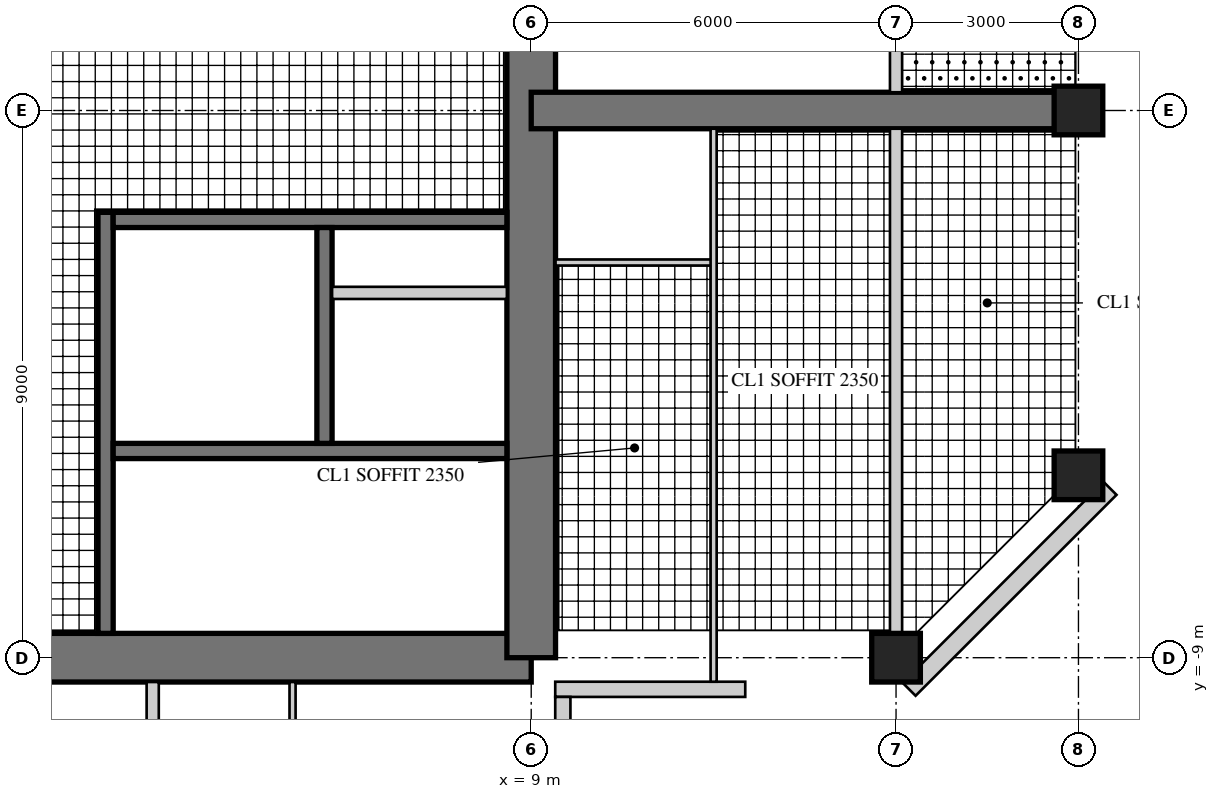
"""IFC4 building model, lengths in metres.
Left out: names, types, materials, properties, quantities, classifications, styles, units other than length and angle.
Written with IfcOpenShell. Run it as: python <this file> out.ifc"""

import sys

from ifc_helpers import new_model, si_unit, direction, frame, frame_2d, origin, origin_2d, place, context, subcontext, project, spatial, rectangle, hollow_rectangle, extrude, element, fill, save


model = new_model("IFC4")
c1 = context("Model", 3, precision=1e-05, world=origin(), true_north=direction((0.0, 1.0)))
c2 = subcontext(c1, "Body", "Model", "MODEL_VIEW")
j1 = project(units=[si_unit("LENGTHUNIT", "METRE"), si_unit("PLANEANGLEUNIT", "RADIAN")], contexts=[c1])
p1 = place(None, origin())
s1 = spatial("IfcSite", under=j1, at=p1, CompositionType="ELEMENT")
p2 = place(p1, origin())
s2 = spatial("IfcBuilding", under=s1, at=p2, CompositionType="ELEMENT")
p3 = place(p2, frame((0.0, 0.0, 235.7)))
s3 = spatial("IfcBuildingStorey", under=s2, at=p3, CompositionType="ELEMENT", Elevation=235.7)
p4 = place(p3, frame((-9.0, -9.0, 0.0), z_axis=(0.0, 0.0, 1.0), x_axis=(1.0, 0.0, 0.0)))
e1 = element("IfcWall", 1, at=p4, inside=s3, PredefinedType="SHEAR", context=c2, shape_type="SweptSolid", body=[
    extrude(rectangle(XDim=18.0, YDim=0.8, at=frame_2d((9.0, 0.0))), origin(), (0.0, 0.0, 1.0), 3.4),
])
p5 = place(p4, frame((9.8, 0.0, 0.0)))
e2 = element("IfcOpeningElement", 2, at=p5, cuts=e1, PredefinedType="OPENING", context=c2, shape_type="SweptSolid", body=[
    extrude(rectangle(XDim=1.0, YDim=2.4, at=frame_2d((0.5, 1.2))), frame((0.0, 0.41, 0.0), z_axis=(0.0, -1.0, 0.0), x_axis=(1.0, 0.0, 0.0)), (0.0, 0.0, 1.0), 0.82),
])
p6 = place(p3, frame((9.0, -9.0, 0.0), z_axis=(0.0, 0.0, 1.0), x_axis=(0.0, 1.0, 0.0)))
e3 = element("IfcWall", 3, at=p6, inside=s3, PredefinedType="SHEAR", context=c2, shape_type="SweptSolid", body=[
    extrude(rectangle(XDim=18.0, YDim=0.8, at=frame_2d((9.0, 0.0))), origin(), (0.0, 0.0, 1.0), 3.4),
])
p7 = place(p6, frame((9.8, 0.0, 0.0)))
e4 = element("IfcOpeningElement", 4, at=p7, cuts=e3, PredefinedType="OPENING", context=c2, shape_type="SweptSolid", body=[
    extrude(rectangle(XDim=1.0, YDim=2.4, at=frame_2d((0.5, 1.2))), frame((0.0, 0.41, 0.0), z_axis=(0.0, -1.0, 0.0), x_axis=(1.0, 0.0, 0.0)), (0.0, 0.0, 1.0), 0.82),
])
p8 = place(p3, frame((2.0, -1.675, 0.0), z_axis=(0.0, 0.0, 1.0), x_axis=(0.0, -1.0, 0.0)))
e5 = element("IfcWall", 5, at=p8, inside=s3, PredefinedType="SHEAR", context=c2, shape_type="SweptSolid", body=[
    extrude(rectangle(XDim=6.925, YDim=0.25, at=frame_2d((3.462, 0.0))), origin(), (0.0, 0.0, 1.0), 3.4),
])
p9 = place(p8, frame((0.725, 0.0, 0.0)))
e6 = element("IfcOpeningElement", 6, at=p9, cuts=e5, PredefinedType="OPENING", context=c2, shape_type="SweptSolid", body=[
    extrude(rectangle(XDim=1.0, YDim=2.1, at=frame_2d((0.5, 1.05))), frame((0.0, 0.135, 0.0), z_axis=(0.0, -1.0, 0.0), x_axis=(1.0, 0.0, 0.0)), (0.0, 0.0, 1.0), 0.27),
])
p10 = place(p3, frame((2.125, -1.8, 0.0), z_axis=(0.0, 0.0, 1.0), x_axis=(1.0, 0.0, 0.0)))
e7 = element("IfcWall", 7, at=p10, inside=s3, PredefinedType="SHEAR", context=c2, shape_type="SweptSolid", body=[
    extrude(rectangle(XDim=6.475, YDim=0.25, at=frame_2d((3.238, 0.0))), origin(), (0.0, 0.0, 1.0), 3.4),
])
p11 = place(p3, frame((2.125, -5.6, 0.0), z_axis=(0.0, 0.0, 1.0), x_axis=(1.0, 0.0, 0.0)))
e8 = element("IfcWall", 8, at=p11, inside=s3, PredefinedType="SHEAR", context=c2, shape_type="SweptSolid", body=[
    extrude(rectangle(XDim=6.475, YDim=0.25, at=frame_2d((3.238, 0.0))), origin(), (0.0, 0.0, 1.0), 3.4),
])
p12 = place(p11, frame((0.175, 0.0, 0.0)))
e9 = element("IfcOpeningElement", 9, at=p12, cuts=e8, PredefinedType="OPENING", context=c2, shape_type="SweptSolid", body=[
    extrude(rectangle(XDim=1.0, YDim=2.1, at=frame_2d((0.5, 1.05))), frame((0.0, 0.135, 0.0), z_axis=(0.0, -1.0, 0.0), x_axis=(1.0, 0.0, 0.0)), (0.0, 0.0, 1.0), 0.27),
])
p13 = place(p3, frame((5.6, -1.925, 0.0), z_axis=(0.0, 0.0, 1.0), x_axis=(0.0, -1.0, 0.0)))
e10 = element("IfcWall", 10, at=p13, inside=s3, PredefinedType="SHEAR", context=c2, shape_type="SweptSolid", body=[
    extrude(rectangle(XDim=3.55, YDim=0.25, at=frame_2d((1.775, 0.0))), origin(), (0.0, 0.0, 1.0), 3.4),
])
p14 = place(p13, frame((1.525, 0.0, 0.0)))
e11 = element("IfcOpeningElement", 11, at=p14, cuts=e10, PredefinedType="OPENING", context=c2, shape_type="SweptSolid", body=[
    extrude(rectangle(XDim=1.1, YDim=2.2, at=frame_2d((0.55, 1.1))), frame((0.0, 0.135, 0.0), z_axis=(0.0, -1.0, 0.0), x_axis=(1.0, 0.0, 0.0)), (0.0, 0.0, 1.0), 0.27),
])
p15 = place(p13, frame((0.075, 0.0, 0.0)))
e12 = element("IfcOpeningElement", 12, at=p15, cuts=e10, PredefinedType="OPENING", context=c2, shape_type="SweptSolid", body=[
    extrude(rectangle(XDim=0.8, YDim=2.1, at=frame_2d((0.4, 1.05))), frame((0.0, 0.135, 0.0), z_axis=(0.0, -1.0, 0.0), x_axis=(1.0, 0.0, 0.0)), (0.0, 0.0, 1.0), 0.27),
])
p16 = place(p3, frame((5.725, -3.0, 0.0), z_axis=(0.0, 0.0, 1.0), x_axis=(1.0, 0.0, 0.0)))
e13 = element("IfcWall", 13, at=p16, inside=s3, PredefinedType="PARTITIONING", context=c2, shape_type="SweptSolid", body=[
    extrude(rectangle(XDim=2.875, YDim=0.2, at=frame_2d((1.438, 0.0))), origin(), (0.0, 0.0, 1.0), 3.4),
])
p17 = place(p3, frame((9.0, 0.0, 0.0), z_axis=(0.0, 0.0, 1.0), x_axis=(1.0, 0.0, 0.0)))
e14 = element("IfcWall", 14, at=p17, inside=s3, PredefinedType="SHEAR", context=c2, shape_type="SweptSolid", body=[
    extrude(rectangle(XDim=9.0, YDim=0.6, at=frame_2d((4.5, 0.0))), origin(), (0.0, 0.0, 1.0), 3.4),
])
p18 = place(p17, frame((3.8, 0.0, 0.0)))
e15 = element("IfcOpeningElement", 15, at=p18, cuts=e14, PredefinedType="OPENING", context=c2, shape_type="SweptSolid", body=[
    extrude(rectangle(XDim=1.0, YDim=2.15, at=frame_2d((0.5, 1.075))), frame((0.0, 0.31, 0.0), z_axis=(0.0, -1.0, 0.0), x_axis=(1.0, 0.0, 0.0)), (0.0, 0.0, 1.0), 0.62),
])
p19 = place(p17, frame((7.0, 0.0, 0.0)))
e16 = element("IfcOpeningElement", 16, at=p19, cuts=e14, PredefinedType="OPENING", context=c2, shape_type="SweptSolid", body=[
    extrude(rectangle(XDim=1.0, YDim=2.2, at=frame_2d((0.5, 1.1))), frame((0.0, 0.31, 0.0), z_axis=(0.0, -1.0, 0.0), x_axis=(1.0, 0.0, 0.0)), (0.0, 0.0, 1.0), 0.62),
])
for number, where, z_axis, x_axis in (
    (17, (15.0, -9.0, 0.0), (0.0, 0.0, 1.0), (1.0, 0.0, 0.0)),
    (18, (18.0, -6.0, 0.0), (0.0, 0.0, 1.0), (1.0, 0.0, 0.0)),
    (19, (18.0, 0.0, 0.0), (0.0, 0.0, 1.0), (1.0, 0.0, 0.0)),
):
    element("IfcColumn", number, at=place(p3, frame(where, z_axis=z_axis, x_axis=x_axis)), inside=s3, PredefinedType="COLUMN", context=c2, shape_type="SweptSolid", body=[
        extrude(rectangle(XDim=0.8, YDim=0.8, at=origin_2d()), origin(), (0.0, 0.0, 1.0), 3.4),
    ])
p20 = place(p3, frame((9.395, -9.52, 0.0), z_axis=(0.0, 0.0, 1.0), x_axis=(1.0, 0.0, 0.0)))
e20 = element("IfcWall", 20, at=p20, inside=s3, PredefinedType="SOLIDWALL", context=c2, shape_type="SweptSolid", body=[
    extrude(rectangle(XDim=3.125, YDim=0.25, at=frame_2d((1.562, 0.0))), origin(), (0.0, 0.0, 1.0), 3.22),
])
p21 = place(p20, frame((0.6, 0.0, 0.0)))
e21 = element("IfcOpeningElement", 21, at=p21, cuts=e20, PredefinedType="OPENING", context=c2, shape_type="SweptSolid", body=[
    extrude(rectangle(XDim=1.0, YDim=2.2, at=frame_2d((0.5, 1.1))), frame((0.0, 0.135, 0.0), z_axis=(0.0, -1.0, 0.0), x_axis=(1.0, 0.0, 0.0)), (0.0, 0.0, 1.0), 0.27),
])
p22 = place(p3, frame((15.215, -9.52, 0.0), z_axis=(0.0, 0.0, 1.0), x_axis=(0.707106781187, 0.707106781187, 0.0)))
e22 = element("IfcWall", 22, at=p22, inside=s3, PredefinedType="SOLIDWALL", context=c2, shape_type="SweptSolid", body=[
    extrude(rectangle(XDim=4.674, YDim=0.3, at=frame_2d((2.337, 0.0))), origin(), (0.0, 0.0, 1.0), 3.22),
])
p23 = place(p22, frame((1.887, 0.0, 0.3)))
e23 = element("IfcOpeningElement", 23, at=p23, cuts=e22, PredefinedType="OPENING", context=c2, shape_type="SweptSolid", body=[
    extrude(rectangle(XDim=0.9, YDim=2.4, at=frame_2d((0.45, 1.2))), frame((0.0, 0.16, 0.0), z_axis=(0.0, -1.0, 0.0), x_axis=(1.0, 0.0, 0.0)), (0.0, 0.0, 1.0), 0.32),
])
p24 = place(p3, frame((9.52, -12.52, 0.0), z_axis=(0.0, 0.0, 1.0), x_axis=(0.0, 1.0, 0.0)))
e24 = element("IfcWall", 24, at=p24, inside=s3, PredefinedType="SOLIDWALL", context=c2, shape_type="SweptSolid", body=[
    extrude(rectangle(XDim=2.875, YDim=0.25, at=frame_2d((1.438, 0.0))), origin(), (0.0, 0.0, 1.0), 3.22),
])
p25 = place(p24, frame((0.6, 0.0, 0.0)))
e25 = element("IfcOpeningElement", 25, at=p25, cuts=e24, PredefinedType="OPENING", context=c2, shape_type="SweptSolid", body=[
    extrude(rectangle(XDim=1.0, YDim=2.2, at=frame_2d((0.5, 1.1))), frame((0.0, 0.135, 0.0), z_axis=(0.0, -1.0, 0.0), x_axis=(1.0, 0.0, 0.0)), (0.0, 0.0, 1.0), 0.27),
])
p26 = place(p3, frame((9.4, -2.5, 0.0), z_axis=(0.0, 0.0, 1.0), x_axis=(1.0, 0.0, 0.0)))
e26 = element("IfcWall", 26, at=p26, inside=s3, PredefinedType="PARTITIONING", context=c2, shape_type="SweptSolid", body=[
    extrude(rectangle(XDim=2.65, YDim=0.1, at=frame_2d((1.325, 0.0))), origin(), (0.0, 0.0, 1.0), 3.22),
])
p27 = place(p3, frame((12.0, -9.395, 0.0), z_axis=(0.0, 0.0, 1.0), x_axis=(0.0, 1.0, 0.0)))
e27 = element("IfcWall", 27, at=p27, inside=s3, PredefinedType="PARTITIONING", context=c2, shape_type="SweptSolid", body=[
    extrude(rectangle(XDim=9.095, YDim=0.1, at=frame_2d((4.547, 0.0))), origin(), (0.0, 0.0, 1.0), 3.22),
])
p28 = place(p27, frame((5.545, 0.0, 0.0)))
e28 = element("IfcOpeningElement", 28, at=p28, cuts=e27, PredefinedType="OPENING", context=c2, shape_type="SweptSolid", body=[
    extrude(rectangle(XDim=0.9, YDim=2.1, at=frame_2d((0.45, 1.05))), frame((0.0, 0.06, 0.0), z_axis=(0.0, -1.0, 0.0), x_axis=(1.0, 0.0, 0.0)), (0.0, 0.0, 1.0), 0.12),
])
p29 = place(p27, frame((7.645, 0.0, 0.0)))
e29 = element("IfcOpeningElement", 29, at=p29, cuts=e27, PredefinedType="OPENING", context=c2, shape_type="SweptSolid", body=[
    extrude(rectangle(XDim=0.9, YDim=2.1, at=frame_2d((0.45, 1.05))), frame((0.0, 0.06, 0.0), z_axis=(0.0, -1.0, 0.0), x_axis=(1.0, 0.0, 0.0)), (0.0, 0.0, 1.0), 0.12),
])
p30 = place(p3, frame((15.0, -8.6, 0.0), z_axis=(0.0, 0.0, 1.0), x_axis=(0.0, 1.0, 0.0)))
e30 = element("IfcWall", 30, at=p30, inside=s3, PredefinedType="SOLIDWALL", context=c2, shape_type="SweptSolid", body=[
    extrude(rectangle(XDim=8.3, YDim=0.2, at=frame_2d((4.15, 0.0))), origin(), (0.0, 0.0, 1.0), 2.52),
])
p31 = place(p3, frame((15.0, 0.3, 0.0), z_axis=(0.0, 0.0, 1.0), x_axis=(0.0, 1.0, 0.0)))
e31 = element("IfcWall", 31, at=p31, inside=s3, PredefinedType="SOLIDWALL", context=c2, shape_type="SweptSolid", body=[
    extrude(rectangle(XDim=8.3, YDim=0.2, at=frame_2d((4.15, 0.0))), origin(), (0.0, 0.0, 1.0), 2.52),
])
p32 = place(p31, frame((0.45, 0.0, 0.0)))
e32 = element("IfcOpeningElement", 32, at=p32, cuts=e31, PredefinedType="OPENING", context=c2, shape_type="SweptSolid", body=[
    extrude(rectangle(XDim=1.0, YDim=2.2, at=frame_2d((0.5, 1.1))), frame((0.0, 0.11, 0.0), z_axis=(0.0, -1.0, 0.0), x_axis=(1.0, 0.0, 0.0)), (0.0, 0.0, 1.0), 0.22),
])
p33 = place(p3, frame((5.075, -9.4, 0.0), z_axis=(0.0, 0.0, 1.0), x_axis=(0.0, -1.0, 0.0)))
e33 = element("IfcWall", 33, at=p33, inside=s3, PredefinedType="PARTITIONING", context=c2, shape_type="SweptSolid", body=[
    extrude(rectangle(XDim=3.25, YDim=0.1, at=frame_2d((1.625, 0.0))), origin(), (0.0, 0.0, 1.0), 3.22),
])
p34 = place(p3, frame((2.775, -9.4, 0.0), z_axis=(0.0, 0.0, 1.0), x_axis=(0.0, -1.0, 0.0)))
e34 = element("IfcWall", 34, at=p34, inside=s3, PredefinedType="SOLIDWALL", context=c2, shape_type="SweptSolid", body=[
    extrude(rectangle(XDim=5.6, YDim=0.2, at=frame_2d((2.8, 0.0))), origin(), (0.0, 0.0, 1.0), 3.22),
])
p35 = place(p34, frame((3.75, 0.0, 0.0)))
e35 = element("IfcOpeningElement", 35, at=p35, cuts=e34, PredefinedType="OPENING", context=c2, shape_type="SweptSolid", body=[
    extrude(rectangle(XDim=1.0, YDim=2.15, at=frame_2d((0.5, 1.075))), frame((0.0, 0.11, 0.0), z_axis=(0.0, -1.0, 0.0), x_axis=(1.0, 0.0, 0.0)), (0.0, 0.0, 1.0), 0.22),
])
p36 = place(p21, origin())
e36 = element("IfcDoor", 36, at=p36, inside=s3, OperationType="SINGLE_SWING_RIGHT", PredefinedType="DOOR", context=c2, shape_type="SweptSolid", body=[
    extrude(hollow_rectangle(XDim=1.0, YDim=2.2, WallThickness=0.06, at=frame_2d((0.5, 1.1))), frame((0.0, 0.025, 0.0), z_axis=(0.0, -1.0, 0.0), x_axis=(1.0, 0.0, 0.0)), (0.0, 0.0, 1.0), 0.05),
    extrude(rectangle(XDim=0.879, YDim=2.079, at=frame_2d((0.5, 1.1))), frame((0.0, 0.025, 0.0), z_axis=(0.0, -1.0, 0.0), x_axis=(1.0, 0.0, 0.0)), (0.0, 0.0, 1.0), 0.05),
])
fill(e21, e36)
p37 = place(p23, origin())
e37 = element("IfcWindow", 37, at=p37, inside=s3, PartitioningType="SINGLE_PANEL", PredefinedType="WINDOW", context=c2, shape_type="SweptSolid", body=[
    extrude(hollow_rectangle(XDim=0.9, YDim=2.4, WallThickness=0.06, at=frame_2d((0.45, 1.2))), frame((0.0, 0.03, 0.0), z_axis=(0.0, -1.0, 0.0), x_axis=(1.0, 0.0, 0.0)), (0.0, 0.0, 1.0), 0.06),
    extrude(rectangle(XDim=0.779, YDim=2.279, at=frame_2d((0.45, 1.2))), frame((0.0, 0.03, 0.0), z_axis=(0.0, -1.0, 0.0), x_axis=(1.0, 0.0, 0.0)), (0.0, 0.0, 1.0), 0.06),
])
fill(e23, e37)
p38 = place(p28, origin())
e38 = element("IfcDoor", 38, at=p38, inside=s3, OperationType="SINGLE_SWING_RIGHT", PredefinedType="DOOR", context=c2, shape_type="SweptSolid", body=[
    extrude(rectangle(XDim=0.9, YDim=2.1, at=frame_2d((0.45, 1.05))), frame((0.0, 0.025, 0.0), z_axis=(0.0, -1.0, 0.0), x_axis=(1.0, 0.0, 0.0)), (0.0, 0.0, 1.0), 0.05),
])
fill(e28, e38)
p39 = place(p29, origin())
e39 = element("IfcDoor", 39, at=p39, inside=s3, OperationType="SINGLE_SWING_RIGHT", PredefinedType="DOOR", context=c2, shape_type="SweptSolid", body=[
    extrude(rectangle(XDim=0.9, YDim=2.1, at=frame_2d((0.45, 1.05))), frame((0.0, 0.025, 0.0), z_axis=(0.0, -1.0, 0.0), x_axis=(1.0, 0.0, 0.0)), (0.0, 0.0, 1.0), 0.05),
])
fill(e29, e39)
p40 = place(p32, frame((1.0, 0.0, 0.0), z_axis=(0.0, 0.0, 1.0), x_axis=(-1.0, 0.0, 0.0)))
e40 = element("IfcDoor", 40, at=p40, inside=s3, OperationType="SINGLE_SWING_LEFT", PredefinedType="DOOR", context=c2, shape_type="SweptSolid", body=[
    extrude(rectangle(XDim=1.0, YDim=2.2, at=frame_2d((0.5, 1.1))), frame((0.0, 0.025, 0.0), z_axis=(0.0, -1.0, 0.0), x_axis=(1.0, 0.0, 0.0)), (0.0, 0.0, 1.0), 0.05),
])
fill(e32, e40)
p41 = place(p18, frame((1.0, 0.0, 0.0), z_axis=(0.0, 0.0, 1.0), x_axis=(-1.0, 0.0, 0.0)))
e41 = element("IfcDoor", 41, at=p41, inside=s3, OperationType="SINGLE_SWING_RIGHT", PredefinedType="DOOR", context=c2, shape_type="SweptSolid", body=[
    extrude(rectangle(XDim=1.0, YDim=2.15, at=frame_2d((0.5, 1.075))), frame((0.0, 0.025, 0.0), z_axis=(0.0, -1.0, 0.0), x_axis=(1.0, 0.0, 0.0)), (0.0, 0.0, 1.0), 0.05),
])
fill(e15, e41)
p42 = place(p19, origin())
e42 = element("IfcDoor", 42, at=p42, inside=s3, OperationType="SINGLE_SWING_LEFT", PredefinedType="DOOR", context=c2, shape_type="SweptSolid", body=[
    extrude(rectangle(XDim=1.0, YDim=2.2, at=frame_2d((0.5, 1.1))), frame((0.0, 0.025, 0.0), z_axis=(0.0, -1.0, 0.0), x_axis=(1.0, 0.0, 0.0)), (0.0, 0.0, 1.0), 0.05),
])
fill(e16, e42)
p43 = place(p5, origin())
e43 = element("IfcDoor", 43, at=p43, inside=s3, OperationType="SINGLE_SWING_RIGHT", PredefinedType="DOOR", context=c2, shape_type="SweptSolid", body=[
    extrude(rectangle(XDim=1.0, YDim=2.4, at=frame_2d((0.5, 1.2))), frame((0.0, 0.055, 0.0), z_axis=(0.0, -1.0, 0.0), x_axis=(1.0, 0.0, 0.0)), (0.0, 0.0, 1.0), 0.05),
])
fill(e2, e43)
p44 = place(p7, origin())
e44 = element("IfcDoor", 44, at=p44, inside=s3, OperationType="SINGLE_SWING_RIGHT", PredefinedType="DOOR", context=c2, shape_type="SweptSolid", body=[
    extrude(rectangle(XDim=1.0, YDim=2.4, at=frame_2d((0.5, 1.2))), frame((0.0, 0.055, 0.0), z_axis=(0.0, -1.0, 0.0), x_axis=(1.0, 0.0, 0.0)), (0.0, 0.0, 1.0), 0.05),
])
fill(e4, e44)
p45 = place(p9, origin())
e45 = element("IfcDoor", 45, at=p45, inside=s3, OperationType="SINGLE_SWING_LEFT", PredefinedType="DOOR", context=c2, shape_type="SweptSolid", body=[
    extrude(rectangle(XDim=1.0, YDim=2.1, at=frame_2d((0.5, 1.05))), frame((0.0, 0.025, 0.0), z_axis=(0.0, -1.0, 0.0), x_axis=(1.0, 0.0, 0.0)), (0.0, 0.0, 1.0), 0.05),
])
fill(e6, e45)
p46 = place(p12, frame((1.0, 0.0, 0.0), z_axis=(0.0, 0.0, 1.0), x_axis=(-1.0, 0.0, 0.0)))
e46 = element("IfcDoor", 46, at=p46, inside=s3, OperationType="SINGLE_SWING_RIGHT", PredefinedType="DOOR", context=c2, shape_type="SweptSolid", body=[
    extrude(rectangle(XDim=1.0, YDim=2.1, at=frame_2d((0.5, 1.05))), frame((0.0, 0.025, 0.0), z_axis=(0.0, -1.0, 0.0), x_axis=(1.0, 0.0, 0.0)), (0.0, 0.0, 1.0), 0.05),
])
fill(e9, e46)
p47 = place(p14, origin())
e47 = element("IfcDoor", 47, at=p47, inside=s3, OperationType="DOUBLE_DOOR_SLIDING", PredefinedType="DOOR", context=c2, shape_type="SweptSolid", body=[
    extrude(rectangle(XDim=1.1, YDim=2.2, at=frame_2d((0.55, 1.1))), frame((0.0, 0.025, 0.0), z_axis=(0.0, -1.0, 0.0), x_axis=(1.0, 0.0, 0.0)), (0.0, 0.0, 1.0), 0.05),
])
fill(e11, e47)
p48 = place(p15, origin())
e48 = element("IfcDoor", 48, at=p48, inside=s3, OperationType="SINGLE_SWING_LEFT", PredefinedType="DOOR", context=c2, shape_type="SweptSolid", body=[
    extrude(rectangle(XDim=0.8, YDim=2.1, at=frame_2d((0.4, 1.05))), frame((0.0, 0.025, 0.0), z_axis=(0.0, -1.0, 0.0), x_axis=(1.0, 0.0, 0.0)), (0.0, 0.0, 1.0), 0.05),
])
fill(e12, e48)
save(model, sys.argv[1])
